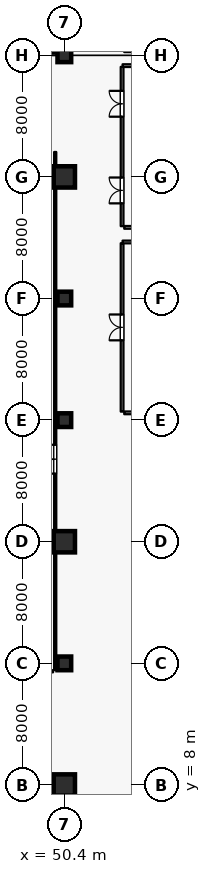
"""IFC4 building model, lengths in metres.
Left out: names, types, materials, properties, quantities, classifications, styles, units other than length and angle.
Written with IfcOpenShell. Run it as: python <this file> out.ifc"""

import sys

from ifc_helpers import new_model, si_unit, direction, frame, frame_2d, origin, origin_2d, place, context, subcontext, project, spatial, rectangle, circle, extrude, element, fill, save


model = new_model("IFC4")
c1 = context("Model", 3, precision=1e-05, world=origin(), true_north=direction((0.0, 1.0)))
c2 = subcontext(c1, "Body", "Model", "MODEL_VIEW")
j1 = project(units=[si_unit("LENGTHUNIT", "METRE"), si_unit("PLANEANGLEUNIT", "RADIAN")], contexts=[c1])
p1 = place(None, origin())
s1 = spatial("IfcSite", under=j1, at=p1, CompositionType="ELEMENT")
p2 = place(p1, origin())
s2 = spatial("IfcBuilding", under=s1, at=p2, CompositionType="ELEMENT")
p3 = place(p2, frame((0.0, 0.0, 11.4)))
s3 = spatial("IfcBuildingStorey", under=s2, at=p3, CompositionType="ELEMENT", Elevation=11.4)
p4 = place(p3, frame((50.4, 8.0, 0.0), z_axis=(0.0, 0.0, 1.0), x_axis=(1.0, 0.0, 0.0)))
e1 = element("IfcColumn", 1, at=p4, inside=s3, PredefinedType="COLUMN", context=c2, shape_type="SweptSolid", body=[
    extrude(circle(Radius=0.7, at=origin_2d()), origin(), (0.0, 0.0, 1.0), 4.8),
])
p5 = place(p3, frame((50.4, 16.0, 0.0), z_axis=(0.0, 0.0, 1.0), x_axis=(1.0, 0.0, 0.0)))
e2 = element("IfcColumn", 2, at=p5, inside=s3, PredefinedType="COLUMN", context=c2, shape_type="SweptSolid", body=[
    extrude(rectangle(XDim=0.9, YDim=0.9, at=origin_2d()), origin(), (0.0, 0.0, 1.0), 4.8),
])
p6 = place(p3, frame((50.4, 24.0, 0.0), z_axis=(0.0, 0.0, 1.0), x_axis=(1.0, 0.0, 0.0)))
e3 = element("IfcColumn", 3, at=p6, inside=s3, PredefinedType="COLUMN", context=c2, shape_type="SweptSolid", body=[
    extrude(circle(Radius=0.7, at=origin_2d()), origin(), (0.0, 0.0, 1.0), 4.8),
])
for number, where, z_axis, x_axis in (
    (4, (50.4, 32.0, 0.0), (0.0, 0.0, 1.0), (1.0, 0.0, 0.0)),
    (5, (50.4, 40.0, 0.0), (0.0, 0.0, 1.0), (1.0, 0.0, 0.0)),
):
    element("IfcColumn", number, at=place(p3, frame(where, z_axis=z_axis, x_axis=x_axis)), inside=s3, PredefinedType="COLUMN", context=c2, shape_type="SweptSolid", body=[
        extrude(rectangle(XDim=0.9, YDim=0.9, at=origin_2d()), origin(), (0.0, 0.0, 1.0), 4.8),
    ])
p7 = place(p3, frame((50.4, 48.0, 0.0), z_axis=(0.0, 0.0, 1.0), x_axis=(1.0, 0.0, 0.0)))
e6 = element("IfcColumn", 6, at=p7, inside=s3, PredefinedType="COLUMN", context=c2, shape_type="SweptSolid", body=[
    extrude(circle(Radius=0.7, at=origin_2d()), origin(), (0.0, 0.0, 1.0), 4.8),
])
p8 = place(p3, frame((50.4, 56.0, 0.0), z_axis=(0.0, 0.0, 1.0), x_axis=(1.0, 0.0, 0.0)))
e7 = element("IfcColumn", 7, at=p8, inside=s3, PredefinedType="COLUMN", context=c2, shape_type="SweptSolid", body=[
    extrude(rectangle(XDim=0.9, YDim=0.9, at=origin_2d()), origin(), (0.0, 0.0, 1.0), 4.8),
])
p9 = place(p3, frame((42.39, 56.25, 0.0), z_axis=(0.0, 0.0, 1.0), x_axis=(1.0, 0.0, 0.0)))
e8 = element("IfcWall", 8, at=p9, inside=s3, PredefinedType="PARAPET", context=c2, shape_type="SweptSolid", body=[
    extrude(rectangle(XDim=7.42, YDim=0.19, at=frame_2d((3.71, 0.0))), origin(), (0.0, 0.0, 1.0), 1.2),
])
p10 = place(p3, frame((49.8, 15.56, 0.0), z_axis=(0.0, 0.0, 1.0), x_axis=(0.0, 1.0, 0.0)))
e9 = element("IfcWall", 9, at=p10, inside=s3, PredefinedType="PARTITIONING", context=c2, shape_type="SweptSolid", body=[
    extrude(rectangle(XDim=34.08, YDim=0.14, at=frame_2d((17.04, 0.0))), origin(), (0.0, 0.0, 1.0), 4.535),
])
p11 = place(p10, frame((12.92, 0.0, 0.0)))
e10 = element("IfcOpeningElement", 10, at=p11, cuts=e9, PredefinedType="OPENING", context=c2, shape_type="SweptSolid", body=[
    extrude(rectangle(XDim=1.9, YDim=2.4, at=frame_2d((0.95, 1.2))), frame((0.0, 0.08, 0.0), z_axis=(0.0, -1.0, 0.0), x_axis=(1.0, 0.0, 0.0)), (0.0, 0.0, 1.0), 0.16),
])
p12 = place(p3, frame((42.65, 15.48, 0.0), z_axis=(0.0, 0.0, 1.0), x_axis=(1.0, 0.0, 0.0)))
e11 = element("IfcWall", 11, at=p12, inside=s3, PredefinedType="PARTITIONING", context=c2, shape_type="SweptSolid", body=[
    extrude(rectangle(XDim=7.01, YDim=0.14, at=frame_2d((3.505, 0.0))), origin(), (0.0, 0.0, 1.0), 4.535),
])
p13 = place(p3, frame((54.2, 32.56, 0.0), z_axis=(0.0, 0.0, 1.0), x_axis=(0.0, 1.0, 0.0)))
e12 = element("IfcWall", 12, at=p13, inside=s3, PredefinedType="PARTITIONING", context=c2, shape_type="SweptSolid", body=[
    extrude(rectangle(XDim=11.08, YDim=0.18, at=frame_2d((5.54, 0.0))), origin(), (0.0, 0.0, 1.0), 4.535),
])
p14 = place(p13, frame((4.69, 0.0, 0.0)))
e13 = element("IfcOpeningElement", 13, at=p14, cuts=e12, PredefinedType="OPENING", context=c2, shape_type="SweptSolid", body=[
    extrude(rectangle(XDim=1.7, YDim=2.3, at=frame_2d((0.85, 1.15))), frame((0.0, 0.1, 0.0), z_axis=(0.0, -1.0, 0.0), x_axis=(1.0, 0.0, 0.0)), (0.0, 0.0, 1.0), 0.2),
])
p15 = place(p3, frame((54.34, 32.48, 0.0), z_axis=(0.0, 0.0, 1.0), x_axis=(1.0, 0.0, 0.0)))
e14 = element("IfcWall", 14, at=p15, inside=s3, PredefinedType="PARTITIONING", context=c2, shape_type="SweptSolid", body=[
    extrude(rectangle(XDim=11.61, YDim=0.18, at=frame_2d((5.805, 0.0))), origin(), (0.0, 0.0, 1.0), 4.535),
])
p16 = place(p15, frame((5.1, 0.0, 0.0)))
e15 = element("IfcOpeningElement", 15, at=p16, cuts=e14, PredefinedType="OPENING", context=c2, shape_type="SweptSolid", body=[
    extrude(rectangle(XDim=1.7, YDim=2.3, at=frame_2d((0.85, 1.15))), frame((0.0, 0.1, 0.0), z_axis=(0.0, -1.0, 0.0), x_axis=(1.0, 0.0, 0.0)), (0.0, 0.0, 1.0), 0.2),
])
p17 = place(p3, frame((54.2, 44.76, 0.0), z_axis=(0.0, 0.0, 1.0), x_axis=(0.0, 1.0, 0.0)))
e16 = element("IfcWall", 16, at=p17, inside=s3, PredefinedType="PARTITIONING", context=c2, shape_type="SweptSolid", body=[
    extrude(rectangle(XDim=10.48, YDim=0.18, at=frame_2d((5.24, 0.0))), origin(), (0.0, 0.0, 1.0), 4.535),
])
p18 = place(p17, frame((1.5, 0.0, 0.0)))
e17 = element("IfcOpeningElement", 17, at=p18, cuts=e16, PredefinedType="OPENING", context=c2, shape_type="SweptSolid", body=[
    extrude(rectangle(XDim=1.7, YDim=2.3, at=frame_2d((0.85, 1.15))), frame((0.0, 0.1, 0.0), z_axis=(0.0, -1.0, 0.0), x_axis=(1.0, 0.0, 0.0)), (0.0, 0.0, 1.0), 0.2),
])
p19 = place(p17, frame((7.2, 0.0, 0.0)))
e18 = element("IfcOpeningElement", 18, at=p19, cuts=e16, PredefinedType="OPENING", context=c2, shape_type="SweptSolid", body=[
    extrude(rectangle(XDim=1.7, YDim=2.3, at=frame_2d((0.85, 1.15))), frame((0.0, 0.1, 0.0), z_axis=(0.0, -1.0, 0.0), x_axis=(1.0, 0.0, 0.0)), (0.0, 0.0, 1.0), 0.2),
])
p20 = place(p3, frame((54.34, 44.68, 0.0), z_axis=(0.0, 0.0, 1.0), x_axis=(1.0, 0.0, 0.0)))
e19 = element("IfcWall", 19, at=p20, inside=s3, PredefinedType="PARTITIONING", context=c2, shape_type="SweptSolid", body=[
    extrude(rectangle(XDim=11.61, YDim=0.18, at=frame_2d((5.805, 0.0))), origin(), (0.0, 0.0, 1.0), 4.535),
])
p21 = place(p3, frame((54.232, 43.72, 0.0), z_axis=(0.0, 0.0, 1.0), x_axis=(1.0, 0.0, 0.0)))
e20 = element("IfcWall", 20, at=p21, inside=s3, PredefinedType="PARTITIONING", context=c2, shape_type="SweptSolid", body=[
    extrude(rectangle(XDim=11.798, YDim=0.18, at=frame_2d((5.899, 0.0))), origin(), (0.0, 0.0, 1.0), 4.535),
])
p22 = place(p3, frame((54.232, 55.32, 0.0), z_axis=(0.0, 0.0, 1.0), x_axis=(1.0, 0.0, 0.0)))
e21 = element("IfcWall", 21, at=p22, inside=s3, PredefinedType="PARTITIONING", context=c2, shape_type="SweptSolid", body=[
    extrude(rectangle(XDim=4.168, YDim=0.18, at=frame_2d((2.084, 0.0))), origin(), (0.0, 0.0, 1.0), 4.535),
])
p23 = place(p11, origin())
e22 = element("IfcDoor", 22, at=p23, inside=s3, OperationType="DOUBLE_DOOR_SINGLE_SWING", PredefinedType="DOOR", context=c2, shape_type="SweptSolid", body=[
    extrude(rectangle(XDim=1.9, YDim=2.4, at=frame_2d((0.95, 1.2))), frame((0.0, 0.025, 0.0), z_axis=(0.0, -1.0, 0.0), x_axis=(1.0, 0.0, 0.0)), (0.0, 0.0, 1.0), 0.05),
])
fill(e10, e22)
p24 = place(p14, origin())
e23 = element("IfcDoor", 23, at=p24, inside=s3, OperationType="DOUBLE_DOOR_SINGLE_SWING", PredefinedType="DOOR", context=c2, shape_type="SweptSolid", body=[
    extrude(rectangle(XDim=1.7, YDim=2.3, at=frame_2d((0.85, 1.15))), frame((0.0, 0.025, 0.0), z_axis=(0.0, -1.0, 0.0), x_axis=(1.0, 0.0, 0.0)), (0.0, 0.0, 1.0), 0.05),
])
fill(e13, e23)
p25 = place(p18, origin())
e24 = element("IfcDoor", 24, at=p25, inside=s3, OperationType="DOUBLE_DOOR_SINGLE_SWING", PredefinedType="DOOR", context=c2, shape_type="SweptSolid", body=[
    extrude(rectangle(XDim=1.7, YDim=2.3, at=frame_2d((0.85, 1.15))), frame((0.0, 0.025, 0.0), z_axis=(0.0, -1.0, 0.0), x_axis=(1.0, 0.0, 0.0)), (0.0, 0.0, 1.0), 0.05),
])
fill(e17, e24)
p26 = place(p19, origin())
e25 = element("IfcDoor", 25, at=p26, inside=s3, OperationType="DOUBLE_DOOR_SINGLE_SWING", PredefinedType="DOOR", context=c2, shape_type="SweptSolid", body=[
    extrude(rectangle(XDim=1.7, YDim=2.3, at=frame_2d((0.85, 1.15))), frame((0.0, 0.025, 0.0), z_axis=(0.0, -1.0, 0.0), x_axis=(1.0, 0.0, 0.0)), (0.0, 0.0, 1.0), 0.05),
])
fill(e18, e25)
save(model, sys.argv[1])
